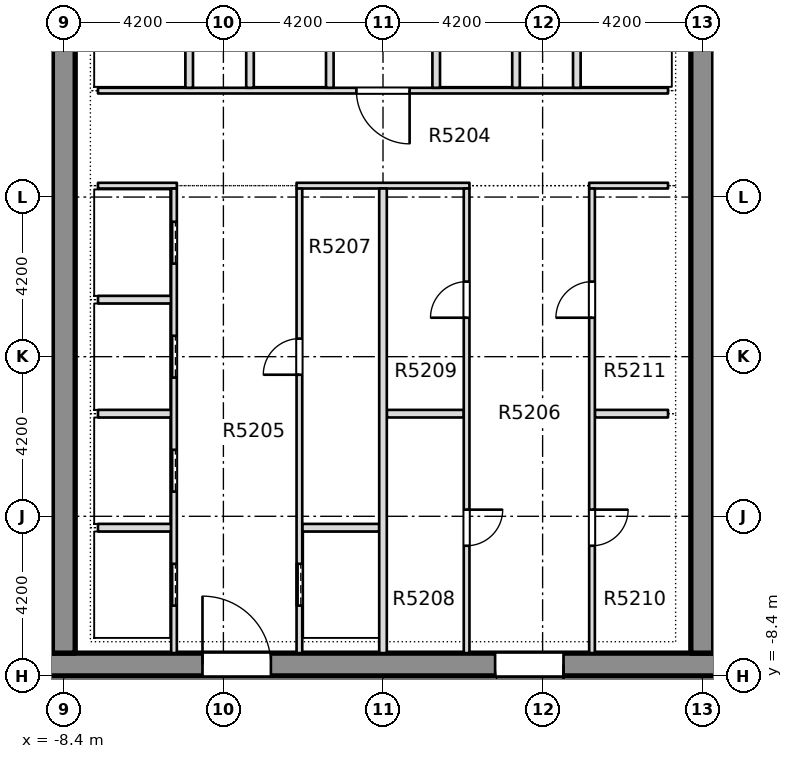
"""IFC4 building model, lengths in metres.
Left out: names, types, materials, properties, quantities, classifications, styles, units other than length and angle.
Written with IfcOpenShell. Run it as: python <this file> out.ifc"""

import sys

from ifc_helpers import new_model, si_unit, direction, frame, frame_2d, origin, place, context, subcontext, project, spatial, rectangle, extrude, element, fill, save


model = new_model("IFC4")
c1 = context("Model", 3, precision=1e-05, world=origin(), true_north=direction((0.0, 1.0)))
c2 = subcontext(c1, "Body", "Model", "MODEL_VIEW")
j1 = project(units=[si_unit("LENGTHUNIT", "METRE"), si_unit("PLANEANGLEUNIT", "RADIAN")], contexts=[c1])
p1 = place(None, origin())
s1 = spatial("IfcSite", under=j1, at=p1, CompositionType="ELEMENT")
p2 = place(p1, origin())
s2 = spatial("IfcBuilding", under=s1, at=p2, CompositionType="ELEMENT")
p3 = place(p2, frame((0.0, 0.0, 199.7)))
s3 = spatial("IfcBuildingStorey", under=s2, at=p3, CompositionType="ELEMENT", Elevation=199.7)
p4 = place(p3, frame((-12.0, -8.1, -0.4), z_axis=(0.0, 0.0, 1.0), x_axis=(1.0, 0.0, 0.0)))
e1 = element("IfcWall", 1, at=p4, inside=s3, PredefinedType="SHEAR", context=c2, shape_type="SweptSolid", body=[
    extrude(rectangle(XDim=24.0, YDim=0.6, at=frame_2d((12.0, 0.0))), origin(), (0.0, 0.0, 1.0), 3.45),
])
p5 = place(p4, frame((7.25, 0.0, 0.4)))
e2 = element("IfcOpeningElement", 2, at=p5, cuts=e1, PredefinedType="OPENING", context=c2, shape_type="SweptSolid", body=[
    extrude(rectangle(XDim=1.8, YDim=2.1, at=frame_2d((0.9, 1.05))), frame((0.0, 0.31, 0.0), z_axis=(0.0, -1.0, 0.0), x_axis=(1.0, 0.0, 0.0)), (0.0, 0.0, 1.0), 0.62),
])
p6 = place(p4, frame((14.95, 0.0, 0.4)))
e3 = element("IfcOpeningElement", 3, at=p6, cuts=e1, PredefinedType="OPENING", context=c2, shape_type="SweptSolid", body=[
    extrude(rectangle(XDim=1.8, YDim=2.1, at=frame_2d((0.9, 1.05))), frame((0.0, 0.31, 0.0), z_axis=(0.0, -1.0, 0.0), x_axis=(1.0, 0.0, 0.0)), (0.0, 0.0, 1.0), 0.62),
])
p7 = place(p3, frame((-8.4, -7.8, -0.4), z_axis=(0.0, 0.0, 1.0), x_axis=(0.0, 1.0, 0.0)))
e4 = element("IfcWall", 4, at=p7, inside=s3, PredefinedType="SHEAR", context=c2, shape_type="SweptSolid", body=[
    extrude(rectangle(XDim=28.95, YDim=0.6, at=frame_2d((14.475, 0.0))), origin(), (0.0, 0.0, 1.0), 3.45),
])
p8 = place(p7, frame((18.7, 0.0, 0.4)))
e5 = element("IfcOpeningElement", 5, at=p8, cuts=e4, PredefinedType="OPENING", context=c2, shape_type="SweptSolid", body=[
    extrude(rectangle(XDim=1.2, YDim=2.1, at=frame_2d((0.6, 1.05))), frame((0.0, 0.31, 0.0), z_axis=(0.0, -1.0, 0.0), x_axis=(1.0, 0.0, 0.0)), (0.0, 0.0, 1.0), 0.62),
])
p9 = place(p3, frame((8.4, -7.8, -0.4), z_axis=(0.0, 0.0, 1.0), x_axis=(0.0, 1.0, 0.0)))
e6 = element("IfcWall", 6, at=p9, inside=s3, PredefinedType="SHEAR", context=c2, shape_type="SweptSolid", body=[
    extrude(rectangle(XDim=28.95, YDim=0.6, at=frame_2d((14.475, 0.0))), origin(), (0.0, 0.0, 1.0), 3.45),
])
p10 = place(p9, frame((18.7, 0.0, 0.4)))
e7 = element("IfcOpeningElement", 7, at=p10, cuts=e6, PredefinedType="OPENING", context=c2, shape_type="SweptSolid", body=[
    extrude(rectangle(XDim=1.2, YDim=2.1, at=frame_2d((0.6, 1.05))), frame((0.0, 0.31, 0.0), z_axis=(0.0, -1.0, 0.0), x_axis=(1.0, 0.0, 0.0)), (0.0, 0.0, 1.0), 0.62),
])
p11 = place(p3, frame((-7.5, -4.5, 0.0), z_axis=(0.0, 0.0, 1.0), x_axis=(1.0, 0.0, 0.0)))
e8 = element("IfcWall", 8, at=p11, inside=s3, PredefinedType="PARTITIONING", context=c2, shape_type="SweptSolid", body=[
    extrude(rectangle(XDim=1.925, YDim=0.2, at=frame_2d((0.962, 0.0))), origin(), (0.0, 0.0, 1.0), 3.05),
])
p12 = place(p3, frame((-2.125, -4.5, 0.0), z_axis=(0.0, 0.0, 1.0), x_axis=(1.0, 0.0, 0.0)))
e9 = element("IfcWall", 9, at=p12, inside=s3, PredefinedType="PARTITIONING", context=c2, shape_type="SweptSolid", body=[
    extrude(rectangle(XDim=2.025, YDim=0.2, at=frame_2d((1.012, 0.0))), origin(), (0.0, 0.0, 1.0), 3.05),
])
p13 = place(p3, frame((-7.5, -1.5, 0.0), z_axis=(0.0, 0.0, 1.0), x_axis=(1.0, 0.0, 0.0)))
e10 = element("IfcWall", 10, at=p13, inside=s3, PredefinedType="PARTITIONING", context=c2, shape_type="SweptSolid", body=[
    extrude(rectangle(XDim=1.925, YDim=0.2, at=frame_2d((0.962, 0.0))), origin(), (0.0, 0.0, 1.0), 3.05),
])
p14 = place(p3, frame((0.1, -1.5, 0.0), z_axis=(0.0, 0.0, 1.0), x_axis=(1.0, 0.0, 0.0)))
e11 = element("IfcWall", 11, at=p14, inside=s3, PredefinedType="PARTITIONING", context=c2, shape_type="SweptSolid", body=[
    extrude(rectangle(XDim=2.025, YDim=0.2, at=frame_2d((1.012, 0.0))), origin(), (0.0, 0.0, 1.0), 3.05),
])
for number, where, z_axis, x_axis in (
    (12, (5.575, -1.5, 0.0), (0.0, 0.0, 1.0), (1.0, 0.0, 0.0)),
    (13, (-7.5, 1.5, 0.0), (0.0, 0.0, 1.0), (1.0, 0.0, 0.0)),
):
    element("IfcWall", number, at=place(p3, frame(where, z_axis=z_axis, x_axis=x_axis)), inside=s3, PredefinedType="PARTITIONING", context=c2, shape_type="SweptSolid", body=[
        extrude(rectangle(XDim=1.925, YDim=0.2, at=frame_2d((0.962, 0.0))), origin(), (0.0, 0.0, 1.0), 3.05),
    ])
p15 = place(p3, frame((-7.5, 4.5, 0.0), z_axis=(0.0, 0.0, 1.0), x_axis=(1.0, 0.0, 0.0)))
e14 = element("IfcWall", 14, at=p15, inside=s3, PredefinedType="PARTITIONING", context=c2, shape_type="SweptSolid", body=[
    extrude(rectangle(XDim=2.075, YDim=0.15, at=frame_2d((1.038, 0.0))), origin(), (0.0, 0.0, 1.0), 3.05),
])
p16 = place(p3, frame((-2.275, 4.5, 0.0), z_axis=(0.0, 0.0, 1.0), x_axis=(1.0, 0.0, 0.0)))
e15 = element("IfcWall", 15, at=p16, inside=s3, PredefinedType="PARTITIONING", context=c2, shape_type="SweptSolid", body=[
    extrude(rectangle(XDim=4.55, YDim=0.15, at=frame_2d((2.275, 0.0))), origin(), (0.0, 0.0, 1.0), 3.05),
])
p17 = place(p3, frame((5.425, 4.5, 0.0), z_axis=(0.0, 0.0, 1.0), x_axis=(1.0, 0.0, 0.0)))
e16 = element("IfcWall", 16, at=p17, inside=s3, PredefinedType="PARTITIONING", context=c2, shape_type="SweptSolid", body=[
    extrude(rectangle(XDim=2.075, YDim=0.15, at=frame_2d((1.038, 0.0))), origin(), (0.0, 0.0, 1.0), 3.05),
])
p18 = place(p3, frame((-7.5, 7.0, 0.0), z_axis=(0.0, 0.0, 1.0), x_axis=(1.0, 0.0, 0.0)))
e17 = element("IfcWall", 17, at=p18, inside=s3, PredefinedType="PARTITIONING", context=c2, shape_type="SweptSolid", body=[
    extrude(rectangle(XDim=15.0, YDim=0.15, at=frame_2d((7.5, 0.0))), origin(), (0.0, 0.0, 1.0), 3.05),
])
p19 = place(p18, frame((6.8, 0.0, 0.0)))
e18 = element("IfcOpeningElement", 18, at=p19, cuts=e17, PredefinedType="OPENING", context=c2, shape_type="SweptSolid", body=[
    extrude(rectangle(XDim=1.4, YDim=2.1, at=frame_2d((0.7, 1.05))), frame((0.0, 0.085, 0.0), z_axis=(0.0, -1.0, 0.0), x_axis=(1.0, 0.0, 0.0)), (0.0, 0.0, 1.0), 0.17),
])
p20 = place(p3, frame((-5.5, -7.799, 0.0), z_axis=(0.0, 0.0, 1.0), x_axis=(0.0, 1.0, 0.0)))
e19 = element("IfcWall", 19, at=p20, inside=s3, PredefinedType="PARTITIONING", context=c2, shape_type="SweptSolid", body=[
    extrude(rectangle(XDim=12.224, YDim=0.15, at=frame_2d((6.112, 0.0))), origin(), (0.0, 0.0, 1.0), 3.05),
])
p21 = place(p20, frame((1.249, 0.0, 0.0)))
e20 = element("IfcOpeningElement", 20, at=p21, cuts=e19, PredefinedType="OPENING", context=c2, shape_type="SweptSolid", body=[
    extrude(rectangle(XDim=1.1, YDim=2.1, at=frame_2d((0.55, 1.05))), frame((0.0, 0.085, 0.0), z_axis=(0.0, -1.0, 0.0), x_axis=(1.0, 0.0, 0.0)), (0.0, 0.0, 1.0), 0.17),
])
p22 = place(p20, frame((4.249, 0.0, 0.0)))
e21 = element("IfcOpeningElement", 21, at=p22, cuts=e19, PredefinedType="OPENING", context=c2, shape_type="SweptSolid", body=[
    extrude(rectangle(XDim=1.1, YDim=2.1, at=frame_2d((0.55, 1.05))), frame((0.0, 0.085, 0.0), z_axis=(0.0, -1.0, 0.0), x_axis=(1.0, 0.0, 0.0)), (0.0, 0.0, 1.0), 0.17),
])
p23 = place(p20, frame((7.249, 0.0, 0.0)))
e22 = element("IfcOpeningElement", 22, at=p23, cuts=e19, PredefinedType="OPENING", context=c2, shape_type="SweptSolid", body=[
    extrude(rectangle(XDim=1.1, YDim=2.1, at=frame_2d((0.55, 1.05))), frame((0.0, 0.085, 0.0), z_axis=(0.0, -1.0, 0.0), x_axis=(1.0, 0.0, 0.0)), (0.0, 0.0, 1.0), 0.17),
])
p24 = place(p20, frame((10.249, 0.0, 0.0)))
e23 = element("IfcOpeningElement", 23, at=p24, cuts=e19, PredefinedType="OPENING", context=c2, shape_type="SweptSolid", body=[
    extrude(rectangle(XDim=1.1, YDim=2.1, at=frame_2d((0.55, 1.05))), frame((0.0, 0.085, 0.0), z_axis=(0.0, -1.0, 0.0), x_axis=(1.0, 0.0, 0.0)), (0.0, 0.0, 1.0), 0.17),
])
p25 = place(p3, frame((-5.1, 7.075, 0.0), z_axis=(0.0, 0.0, 1.0), x_axis=(0.0, 1.0, 0.0)))
e24 = element("IfcWall", 24, at=p25, inside=s3, PredefinedType="PARTITIONING", context=c2, shape_type="SweptSolid", body=[
    extrude(rectangle(XDim=2.725, YDim=0.2, at=frame_2d((1.363, 0.0))), origin(), (0.0, 0.0, 1.0), 3.05),
])
p26 = place(p3, frame((-3.5, 7.075, 0.0), z_axis=(0.0, 0.0, 1.0), x_axis=(0.0, 1.0, 0.0)))
e25 = element("IfcWall", 25, at=p26, inside=s3, PredefinedType="PARTITIONING", context=c2, shape_type="SweptSolid", body=[
    extrude(rectangle(XDim=2.85, YDim=0.2, at=frame_2d((1.425, 0.0))), origin(), (0.0, 0.0, 1.0), 3.05),
])
p27 = place(p3, frame((-2.2, -7.799, 0.0), z_axis=(0.0, 0.0, 1.0), x_axis=(0.0, 1.0, 0.0)))
e26 = element("IfcWall", 26, at=p27, inside=s3, PredefinedType="PARTITIONING", context=c2, shape_type="SweptSolid", body=[
    extrude(rectangle(XDim=12.224, YDim=0.15, at=frame_2d((6.112, 0.0))), origin(), (0.0, 0.0, 1.0), 3.05),
])
p28 = place(p27, frame((1.249, 0.0, 0.0)))
e27 = element("IfcOpeningElement", 27, at=p28, cuts=e26, PredefinedType="OPENING", context=c2, shape_type="SweptSolid", body=[
    extrude(rectangle(XDim=1.1, YDim=2.1, at=frame_2d((0.55, 1.05))), frame((0.0, 0.085, 0.0), z_axis=(0.0, -1.0, 0.0), x_axis=(1.0, 0.0, 0.0)), (0.0, 0.0, 1.0), 0.17),
])
p29 = place(p27, frame((7.324, 0.0, 0.0)))
e28 = element("IfcOpeningElement", 28, at=p29, cuts=e26, PredefinedType="OPENING", context=c2, shape_type="SweptSolid", body=[
    extrude(rectangle(XDim=0.95, YDim=2.1, at=frame_2d((0.475, 1.05))), frame((0.0, 0.085, 0.0), z_axis=(0.0, -1.0, 0.0), x_axis=(1.0, 0.0, 0.0)), (0.0, 0.0, 1.0), 0.17),
])
p30 = place(p3, frame((-1.4, 7.075, 0.0), z_axis=(0.0, 0.0, 1.0), x_axis=(0.0, 1.0, 0.0)))
e29 = element("IfcWall", 29, at=p30, inside=s3, PredefinedType="PARTITIONING", context=c2, shape_type="SweptSolid", body=[
    extrude(rectangle(XDim=2.85, YDim=0.2, at=frame_2d((1.425, 0.0))), origin(), (0.0, 0.0, 1.0), 3.05),
])
p31 = place(p3, frame((0.0, -7.799, 0.0), z_axis=(0.0, 0.0, 1.0), x_axis=(0.0, 1.0, 0.0)))
e30 = element("IfcWall", 30, at=p31, inside=s3, PredefinedType="PARTITIONING", context=c2, shape_type="SweptSolid", body=[
    extrude(rectangle(XDim=12.224, YDim=0.2, at=frame_2d((6.112, 0.0))), origin(), (0.0, 0.0, 1.0), 3.05),
])
p32 = place(p3, frame((1.4, 7.075, 0.0), z_axis=(0.0, 0.0, 1.0), x_axis=(0.0, 1.0, 0.0)))
e31 = element("IfcWall", 31, at=p32, inside=s3, PredefinedType="PARTITIONING", context=c2, shape_type="SweptSolid", body=[
    extrude(rectangle(XDim=2.85, YDim=0.2, at=frame_2d((1.425, 0.0))), origin(), (0.0, 0.0, 1.0), 3.05),
])
p33 = place(p3, frame((2.2, -7.799, 0.0), z_axis=(0.0, 0.0, 1.0), x_axis=(0.0, 1.0, 0.0)))
e32 = element("IfcWall", 32, at=p33, inside=s3, PredefinedType="PARTITIONING", context=c2, shape_type="SweptSolid", body=[
    extrude(rectangle(XDim=12.224, YDim=0.15, at=frame_2d((6.112, 0.0))), origin(), (0.0, 0.0, 1.0), 3.05),
])
p34 = place(p33, frame((2.824, 0.0, 0.0)))
e33 = element("IfcOpeningElement", 33, at=p34, cuts=e32, PredefinedType="OPENING", context=c2, shape_type="SweptSolid", body=[
    extrude(rectangle(XDim=0.95, YDim=2.1, at=frame_2d((0.475, 1.05))), frame((0.0, 0.085, 0.0), z_axis=(0.0, -1.0, 0.0), x_axis=(1.0, 0.0, 0.0)), (0.0, 0.0, 1.0), 0.17),
])
p35 = place(p33, frame((8.824, 0.0, 0.0)))
e34 = element("IfcOpeningElement", 34, at=p35, cuts=e32, PredefinedType="OPENING", context=c2, shape_type="SweptSolid", body=[
    extrude(rectangle(XDim=0.95, YDim=2.1, at=frame_2d((0.475, 1.05))), frame((0.0, 0.085, 0.0), z_axis=(0.0, -1.0, 0.0), x_axis=(1.0, 0.0, 0.0)), (0.0, 0.0, 1.0), 0.17),
])
p36 = place(p3, frame((3.5, 7.075, 0.0), z_axis=(0.0, 0.0, 1.0), x_axis=(0.0, 1.0, 0.0)))
e35 = element("IfcWall", 35, at=p36, inside=s3, PredefinedType="PARTITIONING", context=c2, shape_type="SweptSolid", body=[
    extrude(rectangle(XDim=2.85, YDim=0.2, at=frame_2d((1.425, 0.0))), origin(), (0.0, 0.0, 1.0), 3.05),
])
p37 = place(p3, frame((5.1, 7.075, 0.0), z_axis=(0.0, 0.0, 1.0), x_axis=(0.0, 1.0, 0.0)))
e36 = element("IfcWall", 36, at=p37, inside=s3, PredefinedType="PARTITIONING", context=c2, shape_type="SweptSolid", body=[
    extrude(rectangle(XDim=2.725, YDim=0.2, at=frame_2d((1.363, 0.0))), origin(), (0.0, 0.0, 1.0), 3.05),
])
p38 = place(p3, frame((5.5, -7.799, 0.0), z_axis=(0.0, 0.0, 1.0), x_axis=(0.0, 1.0, 0.0)))
e37 = element("IfcWall", 37, at=p38, inside=s3, PredefinedType="PARTITIONING", context=c2, shape_type="SweptSolid", body=[
    extrude(rectangle(XDim=12.224, YDim=0.15, at=frame_2d((6.112, 0.0))), origin(), (0.0, 0.0, 1.0), 3.05),
])
p39 = place(p38, frame((2.824, 0.0, 0.0)))
e38 = element("IfcOpeningElement", 38, at=p39, cuts=e37, PredefinedType="OPENING", context=c2, shape_type="SweptSolid", body=[
    extrude(rectangle(XDim=0.95, YDim=2.1, at=frame_2d((0.475, 1.05))), frame((0.0, 0.085, 0.0), z_axis=(0.0, -1.0, 0.0), x_axis=(1.0, 0.0, 0.0)), (0.0, 0.0, 1.0), 0.17),
])
p40 = place(p38, frame((8.824, 0.0, 0.0)))
e39 = element("IfcOpeningElement", 39, at=p40, cuts=e37, PredefinedType="OPENING", context=c2, shape_type="SweptSolid", body=[
    extrude(rectangle(XDim=0.95, YDim=2.1, at=frame_2d((0.475, 1.05))), frame((0.0, 0.085, 0.0), z_axis=(0.0, -1.0, 0.0), x_axis=(1.0, 0.0, 0.0)), (0.0, 0.0, 1.0), 0.17),
])
p41 = place(p21, origin())
e40 = element("IfcDoor", 40, at=p41, inside=s3, OperationType="SLIDING_TO_LEFT", PredefinedType="DOOR", context=c2, shape_type="SweptSolid", body=[
    extrude(rectangle(XDim=1.1, YDim=2.1, at=frame_2d((0.55, 1.05))), frame((0.0, 0.025, 0.0), z_axis=(0.0, -1.0, 0.0), x_axis=(1.0, 0.0, 0.0)), (0.0, 0.0, 1.0), 0.05),
])
fill(e20, e40)
p42 = place(p22, origin())
e41 = element("IfcDoor", 41, at=p42, inside=s3, OperationType="SLIDING_TO_LEFT", PredefinedType="DOOR", context=c2, shape_type="SweptSolid", body=[
    extrude(rectangle(XDim=1.1, YDim=2.1, at=frame_2d((0.55, 1.05))), frame((0.0, 0.025, 0.0), z_axis=(0.0, -1.0, 0.0), x_axis=(1.0, 0.0, 0.0)), (0.0, 0.0, 1.0), 0.05),
])
fill(e21, e41)
p43 = place(p23, origin())
e42 = element("IfcDoor", 42, at=p43, inside=s3, OperationType="SLIDING_TO_LEFT", PredefinedType="DOOR", context=c2, shape_type="SweptSolid", body=[
    extrude(rectangle(XDim=1.1, YDim=2.1, at=frame_2d((0.55, 1.05))), frame((0.0, 0.025, 0.0), z_axis=(0.0, -1.0, 0.0), x_axis=(1.0, 0.0, 0.0)), (0.0, 0.0, 1.0), 0.05),
])
fill(e22, e42)
p44 = place(p24, origin())
e43 = element("IfcDoor", 43, at=p44, inside=s3, OperationType="SLIDING_TO_LEFT", PredefinedType="DOOR", context=c2, shape_type="SweptSolid", body=[
    extrude(rectangle(XDim=1.1, YDim=2.1, at=frame_2d((0.55, 1.05))), frame((0.0, 0.025, 0.0), z_axis=(0.0, -1.0, 0.0), x_axis=(1.0, 0.0, 0.0)), (0.0, 0.0, 1.0), 0.05),
])
fill(e23, e43)
p45 = place(p28, origin())
e44 = element("IfcDoor", 44, at=p45, inside=s3, OperationType="SLIDING_TO_LEFT", PredefinedType="DOOR", context=c2, shape_type="SweptSolid", body=[
    extrude(rectangle(XDim=1.1, YDim=2.1, at=frame_2d((0.55, 1.05))), frame((0.0, 0.025, 0.0), z_axis=(0.0, -1.0, 0.0), x_axis=(1.0, 0.0, 0.0)), (0.0, 0.0, 1.0), 0.05),
])
fill(e27, e44)
p46 = place(p29, origin())
e45 = element("IfcDoor", 45, at=p46, inside=s3, OperationType="SINGLE_SWING_RIGHT", PredefinedType="DOOR", context=c2, shape_type="SweptSolid", body=[
    extrude(rectangle(XDim=0.95, YDim=2.1, at=frame_2d((0.475, 1.05))), frame((0.0, 0.025, 0.0), z_axis=(0.0, -1.0, 0.0), x_axis=(1.0, 0.0, 0.0)), (0.0, 0.0, 1.0), 0.05),
])
fill(e28, e45)
p47 = place(p34, origin())
e46 = element("IfcDoor", 46, at=p47, inside=s3, OperationType="SINGLE_SWING_RIGHT", PredefinedType="DOOR", context=c2, shape_type="SweptSolid", body=[
    extrude(rectangle(XDim=0.95, YDim=2.1, at=frame_2d((0.475, 1.05))), frame((0.0, 0.025, 0.0), z_axis=(0.0, -1.0, 0.0), x_axis=(1.0, 0.0, 0.0)), (0.0, 0.0, 1.0), 0.05),
])
fill(e33, e46)
p48 = place(p35, origin())
e47 = element("IfcDoor", 47, at=p48, inside=s3, OperationType="SINGLE_SWING_RIGHT", PredefinedType="DOOR", context=c2, shape_type="SweptSolid", body=[
    extrude(rectangle(XDim=0.95, YDim=2.1, at=frame_2d((0.475, 1.05))), frame((0.0, 0.025, 0.0), z_axis=(0.0, -1.0, 0.0), x_axis=(1.0, 0.0, 0.0)), (0.0, 0.0, 1.0), 0.05),
])
fill(e34, e47)
p49 = place(p39, origin())
e48 = element("IfcDoor", 48, at=p49, inside=s3, OperationType="SINGLE_SWING_LEFT", PredefinedType="DOOR", context=c2, shape_type="SweptSolid", body=[
    extrude(rectangle(XDim=0.95, YDim=2.1, at=frame_2d((0.475, 1.05))), frame((0.0, 0.025, 0.0), z_axis=(0.0, -1.0, 0.0), x_axis=(1.0, 0.0, 0.0)), (0.0, 0.0, 1.0), 0.05),
])
fill(e38, e48)
p50 = place(p40, origin())
e49 = element("IfcDoor", 49, at=p50, inside=s3, OperationType="SINGLE_SWING_LEFT", PredefinedType="DOOR", context=c2, shape_type="SweptSolid", body=[
    extrude(rectangle(XDim=0.95, YDim=2.1, at=frame_2d((0.475, 1.05))), frame((0.0, 0.025, 0.0), z_axis=(0.0, -1.0, 0.0), x_axis=(1.0, 0.0, 0.0)), (0.0, 0.0, 1.0), 0.05),
])
fill(e39, e49)
p51 = place(p19, origin())
e50 = element("IfcDoor", 50, at=p51, inside=s3, OperationType="SINGLE_SWING_RIGHT", PredefinedType="DOOR", context=c2, shape_type="SweptSolid", body=[
    extrude(rectangle(XDim=1.4, YDim=2.1, at=frame_2d((0.7, 1.05))), frame((0.0, 0.025, 0.0), z_axis=(0.0, -1.0, 0.0), x_axis=(1.0, 0.0, 0.0)), (0.0, 0.0, 1.0), 0.05),
])
fill(e18, e50)
p52 = place(p5, origin())
e51 = element("IfcDoor", 51, at=p52, inside=s3, OperationType="SINGLE_SWING_LEFT", PredefinedType="DOOR", context=c2, shape_type="SweptSolid", body=[
    extrude(rectangle(XDim=1.8, YDim=2.1, at=frame_2d((0.9, 1.05))), frame((0.0, 0.025, 0.0), z_axis=(0.0, -1.0, 0.0), x_axis=(1.0, 0.0, 0.0)), (0.0, 0.0, 1.0), 0.05),
])
fill(e2, e51)
p53 = place(p6, origin())
e52 = element("IfcDoor", 52, at=p53, inside=s3, OperationType="SINGLE_SWING_LEFT", PredefinedType="DOOR", context=c2, shape_type="SweptSolid", body=[
    extrude(rectangle(XDim=1.8, YDim=2.1, at=frame_2d((0.9, 1.05))), frame((0.0, 0.025, 0.0), z_axis=(0.0, -1.0, 0.0), x_axis=(1.0, 0.0, 0.0)), (0.0, 0.0, 1.0), 0.05),
])
fill(e3, e52)
save(model, sys.argv[1])
